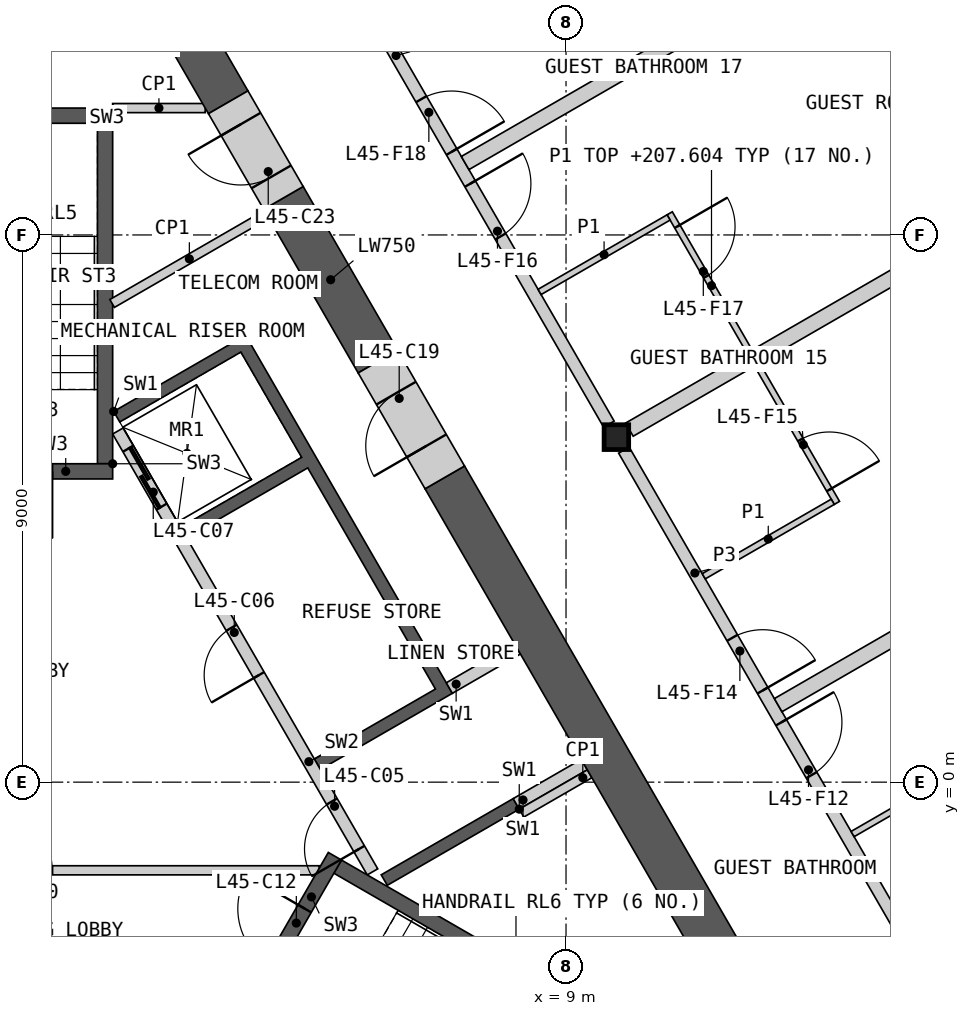
"""IFC4 building model, lengths in metres.
Left out: names, types, materials, properties, quantities, classifications, styles, units other than length and angle.
Written with IfcOpenShell. Run it as: python <this file> out.ifc"""

import sys

from ifc_helpers import new_model, si_unit, direction, frame, frame_2d, origin, origin_2d, place, context, subcontext, project, spatial, polyline, rectangle, i_section, outline, extrude, element, fill, save


model = new_model("IFC4")
c1 = context("Model", 3, precision=1e-05, world=origin(), true_north=direction((0.0, 1.0)))
c2 = subcontext(c1, "Body", "Model", "MODEL_VIEW")
j1 = project(units=[si_unit("LENGTHUNIT", "METRE"), si_unit("PLANEANGLEUNIT", "RADIAN")], contexts=[c1])
p1 = place(None, origin())
s1 = spatial("IfcSite", under=j1, at=p1, CompositionType="ELEMENT")
p2 = place(p1, origin())
s2 = spatial("IfcBuilding", under=s1, at=p2, CompositionType="ELEMENT")
p3 = place(p2, frame((0.0, 0.0, 205.2)))
s3 = spatial("IfcBuildingStorey", under=s2, at=p3, CompositionType="ELEMENT", Elevation=205.2)
p4 = place(p3, frame((9.828, 5.675, 0.0), z_axis=(0.0, 0.0, 1.0), x_axis=(1.0, 0.0, 0.0)))
e1 = element("IfcColumn", 1, at=p4, inside=s3, PredefinedType="COLUMN", context=c2, shape_type="SweptSolid", body=[
    extrude(i_section(OverallWidth=0.404, OverallDepth=0.407, WebThickness=0.027, FlangeThickness=0.044, at=origin_2d()), origin(), (0.0, 0.0, 1.0), 3.6),
])
p5 = place(p3, origin())
e2 = element("IfcWall", 2, at=p5, inside=s3, PredefinedType="SHEAR", context=c2, shape_type="SweptSolid", body=[
    extrude(outline(polyline([(1.561, 6.097), (3.731, 7.35), (7.131, 1.461), (4.96, 0.208), (4.861, 0.381), (6.852, 1.531), (4.752, 5.169), (2.76, 4.019), (2.66, 4.192), (4.652, 5.342), (3.652, 7.074), (1.66, 5.924), (1.561, 6.097)])), origin(), (0.0, 0.0, 1.0), 3.25),
])
p6 = place(p3, origin())
e3 = element("IfcWall", 3, at=p6, inside=s3, PredefinedType="SHEAR", context=c2, shape_type="SweptSolid", body=[
    extrude(outline(polyline([(8.231, -0.444), (6.061, -1.697), (5.96, -1.524), (8.131, -0.271), (8.231, -0.444)])), origin(), (0.0, 0.0, 1.0), 3.25),
])
p7 = place(p3, frame((5.817, -1.476, 0.0), z_axis=(0.0, 0.0, 1.0), x_axis=(-0.500002616675, 0.866023893041, 0.0)))
e4 = element("IfcWall", 4, at=p7, inside=s3, PredefinedType="SOLIDWALL", context=c2, shape_type="SweptSolid", body=[
    extrude(rectangle(XDim=8.373, YDim=0.2, at=frame_2d((4.187, 0.0))), origin(), (0.0, 0.0, 1.0), 3.25),
])
p8 = place(p7, frame((0.437, 0.0, 0.0)))
e5 = element("IfcOpeningElement", 5, at=p8, cuts=e4, PredefinedType="OPENING", context=c2, shape_type="SweptSolid", body=[
    extrude(rectangle(XDim=0.9, YDim=2.1, at=frame_2d((0.45, 1.05))), frame((0.0, 0.11, 0.0), z_axis=(0.0, -1.0, 0.0), x_axis=(1.0, 0.0, 0.0)), (0.0, 0.0, 1.0), 0.22),
])
p9 = place(p7, frame((3.737, 0.0, 0.0)))
e6 = element("IfcOpeningElement", 6, at=p9, cuts=e4, PredefinedType="OPENING", context=c2, shape_type="SweptSolid", body=[
    extrude(rectangle(XDim=0.9, YDim=2.1, at=frame_2d((0.45, 1.05))), frame((0.0, 0.11, 0.0), z_axis=(0.0, -1.0, 0.0), x_axis=(1.0, 0.0, 0.0)), (0.0, 0.0, 1.0), 0.22),
])
p10 = place(p7, frame((6.937, 0.0, 0.0)))
e7 = element("IfcOpeningElement", 7, at=p10, cuts=e4, PredefinedType="OPENING", context=c2, shape_type="SweptSolid", body=[
    extrude(rectangle(XDim=1.1, YDim=2.1, at=frame_2d((0.55, 1.05))), frame((0.0, 0.11, 0.0), z_axis=(0.0, -1.0, 0.0), x_axis=(1.0, 0.0, 0.0)), (0.0, 0.0, 1.0), 0.22),
])
for number, where, z_axis, x_axis in (
    (8, (8.181, -0.357, 0.0), (0.0, 0.0, 1.0), (0.866, 0.5, 0.0)),
    (9, (7.081, 1.548, 0.0), (0.0, 0.0, 1.0), (0.866, 0.5, 0.0)),
):
    element("IfcWall", number, at=place(p3, frame(where, z_axis=z_axis, x_axis=x_axis)), inside=s3, PredefinedType="SHEAR", context=c2, shape_type="SweptSolid", body=[
        extrude(rectangle(XDim=1.293, YDim=0.2, at=frame_2d((0.646, 0.0))), origin(), (0.0, 0.0, 1.0), 3.25),
    ])
p11 = place(p3, frame((-4.941, -1.45, 0.0), z_axis=(0.0, 0.0, 1.0), x_axis=(1.0, 0.0, 0.0)))
e10 = element("IfcWall", 10, at=p11, inside=s3, PredefinedType="PARTITIONING", context=c2, shape_type="SweptSolid", body=[
    extrude(rectangle(XDim=9.882, YDim=0.15, at=frame_2d((4.941, 0.0))), origin(), (0.0, 0.0, 1.0), 3.25),
])
p12 = place(p11, frame((4.391, 0.0, 0.0)))
e11 = element("IfcOpeningElement", 11, at=p12, cuts=e10, PredefinedType="OPENING", context=c2, shape_type="SweptSolid", body=[
    extrude(rectangle(XDim=1.1, YDim=2.1, at=frame_2d((0.55, 1.05))), frame((0.0, 0.085, 0.0), z_axis=(0.0, -1.0, 0.0), x_axis=(1.0, 0.0, 0.0)), (0.0, 0.0, 1.0), 0.17),
])
p13 = place(p3, origin())
e12 = element("IfcWall", 12, at=p13, inside=s3, PredefinedType="SHEAR", context=c2, shape_type="SweptSolid", body=[
    extrude(outline(polyline([(10.032, -4.298), (10.374, -4.206), (5.307, -1.281), (5.182, -1.498), (10.032, -4.298)])), origin(), (0.0, 0.0, 1.0), 3.25),
])
p14 = place(p3, frame((3.655, -3.893, 0.0), z_axis=(0.0, 0.0, 1.0), x_axis=(0.499982516597, 0.866035497597, 0.0)))
e13 = element("IfcWall", 13, at=p14, inside=s3, PredefinedType="SHEAR", context=c2, shape_type="SweptSolid", body=[
    extrude(rectangle(XDim=3.088, YDim=0.25, at=frame_2d((1.544, 0.0))), origin(), (0.0, 0.0, 1.0), 3.25),
])
p15 = place(p14, frame((0.994, 0.0, 0.0)))
e14 = element("IfcOpeningElement", 14, at=p15, cuts=e13, PredefinedType="OPENING", context=c2, shape_type="SweptSolid", body=[
    extrude(rectangle(XDim=1.1, YDim=2.1, at=frame_2d((0.55, 1.05))), frame((0.0, 0.135, 0.0), z_axis=(0.0, -1.0, 0.0), x_axis=(1.0, 0.0, 0.0)), (0.0, 0.0, 1.0), 0.27),
])
p16 = place(p3, origin())
e15 = element("IfcWall", 15, at=p16, inside=s3, PredefinedType="SHEAR", context=c2, shape_type="SweptSolid", body=[
    extrude(outline(polyline([(1.544, 5.237), (1.544, 11.087), (1.294, 10.837), (1.294, 5.237), (1.544, 5.237)])), origin(), (0.0, 0.0, 1.0), 3.25),
])
p17 = place(p3, origin())
e16 = element("IfcWall", 16, at=p17, inside=s3, PredefinedType="SHEAR", context=c2, shape_type="SweptSolid", body=[
    extrude(outline(polyline([(1.544, 11.087), (-1.544, 11.087), (-1.294, 10.837), (1.294, 10.837), (1.544, 11.087)])), origin(), (0.0, 0.0, 1.0), 3.25),
])
p18 = place(p3, frame((1.544, 5.112, 0.0), z_axis=(0.0, 0.0, 1.0), x_axis=(-1.0, 0.0, 0.0)))
e17 = element("IfcWall", 17, at=p18, inside=s3, PredefinedType="SHEAR", context=c2, shape_type="SweptSolid", body=[
    extrude(rectangle(XDim=3.088, YDim=0.25, at=frame_2d((1.544, 0.0))), origin(), (0.0, 0.0, 1.0), 3.25),
])
p19 = place(p18, frame((0.994, 0.0, 0.0)))
e18 = element("IfcOpeningElement", 18, at=p19, cuts=e17, PredefinedType="OPENING", context=c2, shape_type="SweptSolid", body=[
    extrude(rectangle(XDim=1.1, YDim=2.1, at=frame_2d((0.55, 1.05))), frame((0.0, 0.135, 0.0), z_axis=(0.0, -1.0, 0.0), x_axis=(1.0, 0.0, 0.0)), (0.0, 0.0, 1.0), 0.27),
])
p20 = place(p3, frame((8.268, -0.509, 0.0), z_axis=(0.0, 0.0, 1.0), x_axis=(0.866003189247, 0.500038474733, 0.0)))
e19 = element("IfcWall", 19, at=p20, inside=s3, PredefinedType="PARTITIONING", context=c2, shape_type="SweptSolid", body=[
    extrude(rectangle(XDim=1.293, YDim=0.15, at=frame_2d((0.646, 0.0))), origin(), (0.0, 0.0, 1.0), 3.25),
])
p21 = place(p3, frame((4.075, 9.339, 0.0), z_axis=(0.0, 0.0, 1.0), x_axis=(-0.865995658863, -0.500051516177, 0.0)))
e20 = element("IfcWall", 20, at=p21, inside=s3, PredefinedType="PARTITIONING", context=c2, shape_type="SweptSolid", body=[
    extrude(rectangle(XDim=2.933, YDim=0.15, at=frame_2d((1.466, 0.0))), origin(), (0.0, 0.0, 1.0), 3.25),
])
p22 = place(p3, frame((1.544, 11.087, 0.0), z_axis=(0.0, 0.0, 1.0), x_axis=(1.0, 0.0, 0.0)))
e21 = element("IfcWall", 21, at=p22, inside=s3, PredefinedType="PARTITIONING", context=c2, shape_type="SweptSolid", body=[
    extrude(rectangle(XDim=1.522, YDim=0.15, at=frame_2d((0.761, 0.0))), origin(), (0.0, 0.0, 1.0), 3.25),
])
p23 = place(p3, frame((14.526, -8.011, 0.0), z_axis=(0.0, 0.0, 1.0), x_axis=(-0.499996012963, 0.866027705689, 0.0)))
e22 = element("IfcWall", 22, at=p23, inside=s3, PredefinedType="SHEAR", context=c2, shape_type="SweptSolid", body=[
    extrude(rectangle(XDim=15.039, YDim=0.75, at=frame_2d((7.519, 0.0))), origin(), (0.0, 0.0, 1.0), 3.25),
])
p24 = place(p3, frame((3.444, 11.182, 0.0), z_axis=(0.0, 0.0, 1.0), x_axis=(-0.499985517215, 0.866033765263, 0.0)))
e23 = element("IfcWall", 23, at=p24, inside=s3, PredefinedType="SHEAR", context=c2, shape_type="SweptSolid", body=[
    extrude(rectangle(XDim=6.24, YDim=0.75, at=frame_2d((3.12, 0.0))), origin(), (0.0, 0.0, 1.0), 3.25),
])
p25 = place(p3, frame((5.906, 6.918, 0.0), z_axis=(0.0, 0.0, 1.0), x_axis=(-0.500017123375, 0.866015517374, 0.0)))
e24 = element("IfcWall", 24, at=p25, inside=s3, PredefinedType="SHEAR", context=c2, shape_type="SweptSolid", body=[
    extrude(rectangle(XDim=3.108, YDim=0.75, at=frame_2d((1.554, 0.0))), origin(), (0.0, 0.0, 1.0), 3.25),
])
p26 = place(p3, frame((7.006, 5.012, 0.0), z_axis=(0.0, 0.0, 1.0), x_axis=(-0.499946605688, 0.86605622881, 0.0)))
e25 = element("IfcWall", 25, at=p26, inside=s3, PredefinedType="SHEAR", context=c2, shape_type="SweptSolid", body=[
    extrude(rectangle(XDim=2.2, YDim=0.75, at=frame_2d((1.1, 0.0))), origin(), (0.0, 0.0, 1.0), 3.25),
])
p27 = place(p26, frame((0.6, 0.0, 0.0)))
e26 = element("IfcOpeningElement", 26, at=p27, cuts=e25, PredefinedType="OPENING", context=c2, shape_type="SweptSolid", body=[
    extrude(rectangle(XDim=1.0, YDim=2.1, at=frame_2d((0.5, 1.05))), frame((0.0, 0.385, 0.0), z_axis=(0.0, -1.0, 0.0), x_axis=(1.0, 0.0, 0.0)), (0.0, 0.0, 1.0), 0.77),
])
p28 = place(p3, frame((4.353, 9.609, 0.0), z_axis=(0.0, 0.0, 1.0), x_axis=(-0.500071537347, 0.865984097738, 0.0)))
e27 = element("IfcWall", 27, at=p28, inside=s3, PredefinedType="SHEAR", context=c2, shape_type="SweptSolid", body=[
    extrude(rectangle(XDim=1.816, YDim=0.75, at=frame_2d((0.908, 0.0))), origin(), (0.0, 0.0, 1.0), 3.25),
])
p29 = place(p28, frame((0.4, 0.0, 0.0)))
e28 = element("IfcOpeningElement", 28, at=p29, cuts=e27, PredefinedType="OPENING", context=c2, shape_type="SweptSolid", body=[
    extrude(rectangle(XDim=1.0, YDim=2.1, at=frame_2d((0.5, 1.05))), frame((0.0, 0.385, 0.0), z_axis=(0.0, -1.0, 0.0), x_axis=(1.0, 0.0, 0.0)), (0.0, 0.0, 1.0), 0.77),
])
p30 = place(p3, frame((10.042, 5.798, 0.0), z_axis=(0.0, 0.0, 1.0), x_axis=(0.866025883649, 0.499999168849, 0.0)))
e29 = element("IfcWall", 29, at=p30, inside=s3, PredefinedType="PARTITIONING", context=c2, shape_type="SweptSolid", body=[
    extrude(rectangle(XDim=12.652, YDim=0.25, at=frame_2d((6.326, 0.0))), origin(), (0.0, 0.0, 1.0), 2.404),
])
p31 = place(p3, frame((5.038, 13.972, 0.0), z_axis=(0.0, 0.0, 1.0), x_axis=(0.50000393355, -0.866023132736, 0.0)))
e30 = element("IfcWall", 30, at=p31, inside=s3, PredefinedType="PARTITIONING", context=c2, shape_type="SweptSolid", body=[
    extrude(rectangle(XDim=9.335, YDim=0.2, at=frame_2d((4.667, 0.0))), origin(), (0.0, 0.0, 1.0), 3.25),
])
p32 = place(p31, frame((4.77, 0.0, 0.0)))
e31 = element("IfcOpeningElement", 31, at=p32, cuts=e30, PredefinedType="OPENING", context=c2, shape_type="SweptSolid", body=[
    extrude(rectangle(XDim=1.0, YDim=2.1, at=frame_2d((0.5, 1.05))), frame((0.0, 0.11, 0.0), z_axis=(0.0, -1.0, 0.0), x_axis=(1.0, 0.0, 0.0)), (0.0, 0.0, 1.0), 0.22),
])
p33 = place(p31, frame((3.163, 0.0, 0.0)))
e32 = element("IfcOpeningElement", 32, at=p33, cuts=e30, PredefinedType="OPENING", context=c2, shape_type="SweptSolid", body=[
    extrude(rectangle(XDim=1.0, YDim=2.1, at=frame_2d((0.5, 1.05))), frame((0.0, 0.11, 0.0), z_axis=(0.0, -1.0, 0.0), x_axis=(1.0, 0.0, 0.0)), (0.0, 0.0, 1.0), 0.22),
])
p34 = place(p3, frame((9.952, 5.461, 0.0), z_axis=(0.0, 0.0, 1.0), x_axis=(0.50000393355, -0.866023132736, 0.0)))
e33 = element("IfcWall", 33, at=p34, inside=s3, PredefinedType="PARTITIONING", context=c2, shape_type="SweptSolid", body=[
    extrude(rectangle(XDim=9.335, YDim=0.2, at=frame_2d((4.667, 0.0))), origin(), (0.0, 0.0, 1.0), 3.25),
])
p35 = place(p34, frame((5.172, 0.0, 0.0)))
e34 = element("IfcOpeningElement", 34, at=p35, cuts=e33, PredefinedType="OPENING", context=c2, shape_type="SweptSolid", body=[
    extrude(rectangle(XDim=1.0, YDim=2.1, at=frame_2d((0.5, 1.05))), frame((0.0, 0.11, 0.0), z_axis=(0.0, -1.0, 0.0), x_axis=(1.0, 0.0, 0.0)), (0.0, 0.0, 1.0), 0.22),
])
p36 = place(p34, frame((3.565, 0.0, 0.0)))
e35 = element("IfcOpeningElement", 35, at=p36, cuts=e33, PredefinedType="OPENING", context=c2, shape_type="SweptSolid", body=[
    extrude(rectangle(XDim=1.0, YDim=2.1, at=frame_2d((0.5, 1.05))), frame((0.0, 0.11, 0.0), z_axis=(0.0, -1.0, 0.0), x_axis=(1.0, 0.0, 0.0)), (0.0, 0.0, 1.0), 0.22),
])
p37 = place(p3, frame((12.489, 1.266, 0.0), z_axis=(0.0, 0.0, 1.0), x_axis=(0.866026623601, 0.49999788721, 0.0)))
e36 = element("IfcWall", 36, at=p37, inside=s3, PredefinedType="PARTITIONING", context=c2, shape_type="SweptSolid", body=[
    extrude(rectangle(XDim=8.159, YDim=0.25, at=frame_2d((4.079, 0.0))), origin(), (0.0, 0.0, 1.0), 2.404),
])
p38 = place(p3, frame((7.341, 10.183, 0.0), z_axis=(0.0, 0.0, 1.0), x_axis=(0.866028741424, 0.499994218994, 0.0)))
e37 = element("IfcWall", 37, at=p38, inside=s3, PredefinedType="PARTITIONING", context=c2, shape_type="SweptSolid", body=[
    extrude(rectangle(XDim=8.139, YDim=0.25, at=frame_2d((4.07, 0.0))), origin(), (0.0, 0.0, 1.0), 2.404),
])
p39 = place(p3, frame((10.705, 9.356, 0.0), z_axis=(0.0, 0.0, 1.0), x_axis=(0.500015767406, -0.866016300277, 0.0)))
e38 = element("IfcWall", 38, at=p39, inside=s3, PredefinedType="PARTITIONING", context=c2, shape_type="SweptSolid", body=[
    extrude(rectangle(XDim=5.5, YDim=0.1, at=frame_2d((2.75, 0.0))), origin(), (0.0, 0.0, 1.0), 2.404),
])
p40 = place(p39, frame((4.3, 0.0, 0.0)))
e39 = element("IfcOpeningElement", 39, at=p40, cuts=e38, PredefinedType="OPENING", context=c2, shape_type="SweptSolid", body=[
    extrude(rectangle(XDim=0.95, YDim=2.1, at=frame_2d((0.475, 1.05))), frame((0.0, 0.06, 0.0), z_axis=(0.0, -1.0, 0.0), x_axis=(1.0, 0.0, 0.0)), (0.0, 0.0, 1.0), 0.12),
])
p41 = place(p39, frame((0.25, 0.0, 0.0)))
e40 = element("IfcOpeningElement", 40, at=p41, cuts=e38, PredefinedType="OPENING", context=c2, shape_type="SweptSolid", body=[
    extrude(rectangle(XDim=0.95, YDim=2.1, at=frame_2d((0.475, 1.05))), frame((0.0, 0.06, 0.0), z_axis=(0.0, -1.0, 0.0), x_axis=(1.0, 0.0, 0.0)), (0.0, 0.0, 1.0), 0.12),
])
p42 = place(p3, frame((13.713, -0.854, 0.0), z_axis=(0.0, 0.0, 1.0), x_axis=(0.866014668023, 0.500018594424, 0.0)))
e41 = element("IfcWall", 41, at=p42, inside=s3, PredefinedType="PARTITIONING", context=c2, shape_type="SweptSolid", body=[
    extrude(rectangle(XDim=2.45, YDim=0.1, at=frame_2d((1.225, 0.0))), origin(), (0.0, 0.0, 1.0), 2.404),
])
for number, where, z_axis, x_axis in (
    (42, (8.565, 8.063, 0.0), (0.0, 0.0, 1.0), (0.866, 0.5, 0.0)),
    (43, (11.265, 3.386, 0.0), (0.0, 0.0, 1.0), (0.866, 0.5, 0.0)),
):
    element("IfcWall", number, at=place(p3, frame(where, z_axis=z_axis, x_axis=x_axis)), inside=s3, PredefinedType="PARTITIONING", context=c2, shape_type="SweptSolid", body=[
        extrude(rectangle(XDim=2.45, YDim=0.1, at=frame_2d((1.225, 0.0))), origin(), (0.0, 0.0, 1.0), 2.404),
    ])
p43 = place(p8, origin())
e44 = element("IfcDoor", 44, at=p43, inside=s3, OperationType="SINGLE_SWING_LEFT", PredefinedType="DOOR", context=c2, shape_type="SweptSolid", body=[
    extrude(rectangle(XDim=0.9, YDim=2.1, at=frame_2d((0.45, 1.05))), frame((0.0, 0.025, 0.0), z_axis=(0.0, -1.0, 0.0), x_axis=(1.0, 0.0, 0.0)), (0.0, 0.0, 1.0), 0.05),
])
fill(e5, e44)
p44 = place(p9, origin())
e45 = element("IfcDoor", 45, at=p44, inside=s3, OperationType="SINGLE_SWING_LEFT", PredefinedType="DOOR", context=c2, shape_type="SweptSolid", body=[
    extrude(rectangle(XDim=0.9, YDim=2.1, at=frame_2d((0.45, 1.05))), frame((0.0, 0.025, 0.0), z_axis=(0.0, -1.0, 0.0), x_axis=(1.0, 0.0, 0.0)), (0.0, 0.0, 1.0), 0.05),
])
fill(e6, e45)
p45 = place(p10, origin())
e46 = element("IfcDoor", 46, at=p45, inside=s3, OperationType="SLIDING_TO_LEFT", PredefinedType="DOOR", context=c2, shape_type="SweptSolid", body=[
    extrude(rectangle(XDim=1.1, YDim=2.1, at=frame_2d((0.55, 1.05))), frame((0.0, 0.025, 0.0), z_axis=(0.0, -1.0, 0.0), x_axis=(1.0, 0.0, 0.0)), (0.0, 0.0, 1.0), 0.05),
])
fill(e7, e46)
p46 = place(p12, origin())
e47 = element("IfcDoor", 47, at=p46, inside=s3, OperationType="SINGLE_SWING_LEFT", PredefinedType="DOOR", context=c2, shape_type="SweptSolid", body=[
    extrude(rectangle(XDim=1.1, YDim=2.1, at=frame_2d((0.55, 1.05))), frame((0.0, 0.025, 0.0), z_axis=(0.0, -1.0, 0.0), x_axis=(1.0, 0.0, 0.0)), (0.0, 0.0, 1.0), 0.05),
])
fill(e11, e47)
p47 = place(p15, origin())
e48 = element("IfcDoor", 48, at=p47, inside=s3, OperationType="SINGLE_SWING_RIGHT", PredefinedType="DOOR", context=c2, shape_type="SweptSolid", body=[
    extrude(rectangle(XDim=1.1, YDim=2.1, at=frame_2d((0.55, 1.05))), frame((0.0, 0.025, 0.0), z_axis=(0.0, -1.0, 0.0), x_axis=(1.0, 0.0, 0.0)), (0.0, 0.0, 1.0), 0.05),
])
fill(e14, e48)
p48 = place(p19, origin())
e49 = element("IfcDoor", 49, at=p48, inside=s3, OperationType="SINGLE_SWING_LEFT", PredefinedType="DOOR", context=c2, shape_type="SweptSolid", body=[
    extrude(rectangle(XDim=1.1, YDim=2.1, at=frame_2d((0.55, 1.05))), frame((0.0, 0.025, 0.0), z_axis=(0.0, -1.0, 0.0), x_axis=(1.0, 0.0, 0.0)), (0.0, 0.0, 1.0), 0.05),
])
fill(e18, e49)
p49 = place(p27, origin())
e50 = element("IfcDoor", 50, at=p49, inside=s3, OperationType="SINGLE_SWING_LEFT", PredefinedType="DOOR", context=c2, shape_type="SweptSolid", body=[
    extrude(rectangle(XDim=1.0, YDim=2.1, at=frame_2d((0.5, 1.05))), frame((0.0, 0.13, 0.0), z_axis=(0.0, -1.0, 0.0), x_axis=(1.0, 0.0, 0.0)), (0.0, 0.0, 1.0), 0.05),
])
fill(e26, e50)
p50 = place(p29, origin())
e51 = element("IfcDoor", 51, at=p50, inside=s3, OperationType="SINGLE_SWING_RIGHT", PredefinedType="DOOR", context=c2, shape_type="SweptSolid", body=[
    extrude(rectangle(XDim=1.0, YDim=2.1, at=frame_2d((0.5, 1.05))), frame((0.0, 0.13, 0.0), z_axis=(0.0, -1.0, 0.0), x_axis=(1.0, 0.0, 0.0)), (0.0, 0.0, 1.0), 0.05),
])
fill(e28, e51)
p51 = place(p35, origin())
e52 = element("IfcDoor", 52, at=p51, inside=s3, OperationType="SINGLE_SWING_LEFT", PredefinedType="DOOR", context=c2, shape_type="SweptSolid", body=[
    extrude(rectangle(XDim=1.0, YDim=2.1, at=frame_2d((0.5, 1.05))), frame((0.0, 0.025, 0.0), z_axis=(0.0, -1.0, 0.0), x_axis=(1.0, 0.0, 0.0)), (0.0, 0.0, 1.0), 0.05),
])
fill(e34, e52)
p52 = place(p36, origin())
e53 = element("IfcDoor", 53, at=p52, inside=s3, OperationType="SINGLE_SWING_RIGHT", PredefinedType="DOOR", context=c2, shape_type="SweptSolid", body=[
    extrude(rectangle(XDim=1.0, YDim=2.1, at=frame_2d((0.5, 1.05))), frame((0.0, 0.025, 0.0), z_axis=(0.0, -1.0, 0.0), x_axis=(1.0, 0.0, 0.0)), (0.0, 0.0, 1.0), 0.05),
])
fill(e35, e53)
p53 = place(p40, origin())
e54 = element("IfcDoor", 54, at=p53, inside=s3, OperationType="SINGLE_SWING_RIGHT", PredefinedType="DOOR", context=c2, shape_type="SweptSolid", body=[
    extrude(rectangle(XDim=0.95, YDim=2.1, at=frame_2d((0.475, 1.05))), frame((0.0, 0.025, 0.0), z_axis=(0.0, -1.0, 0.0), x_axis=(1.0, 0.0, 0.0)), (0.0, 0.0, 1.0), 0.05),
])
fill(e39, e54)
p54 = place(p32, origin())
e55 = element("IfcDoor", 55, at=p54, inside=s3, OperationType="SINGLE_SWING_LEFT", PredefinedType="DOOR", context=c2, shape_type="SweptSolid", body=[
    extrude(rectangle(XDim=1.0, YDim=2.1, at=frame_2d((0.5, 1.05))), frame((0.0, 0.025, 0.0), z_axis=(0.0, -1.0, 0.0), x_axis=(1.0, 0.0, 0.0)), (0.0, 0.0, 1.0), 0.05),
])
fill(e31, e55)
p55 = place(p41, origin())
e56 = element("IfcDoor", 56, at=p55, inside=s3, OperationType="SINGLE_SWING_LEFT", PredefinedType="DOOR", context=c2, shape_type="SweptSolid", body=[
    extrude(rectangle(XDim=0.95, YDim=2.1, at=frame_2d((0.475, 1.05))), frame((0.0, 0.025, 0.0), z_axis=(0.0, -1.0, 0.0), x_axis=(1.0, 0.0, 0.0)), (0.0, 0.0, 1.0), 0.05),
])
fill(e40, e56)
p56 = place(p33, origin())
e57 = element("IfcDoor", 57, at=p56, inside=s3, OperationType="SINGLE_SWING_RIGHT", PredefinedType="DOOR", context=c2, shape_type="SweptSolid", body=[
    extrude(rectangle(XDim=1.0, YDim=2.1, at=frame_2d((0.5, 1.05))), frame((0.0, 0.025, 0.0), z_axis=(0.0, -1.0, 0.0), x_axis=(1.0, 0.0, 0.0)), (0.0, 0.0, 1.0), 0.05),
])
fill(e32, e57)
save(model, sys.argv[1])
